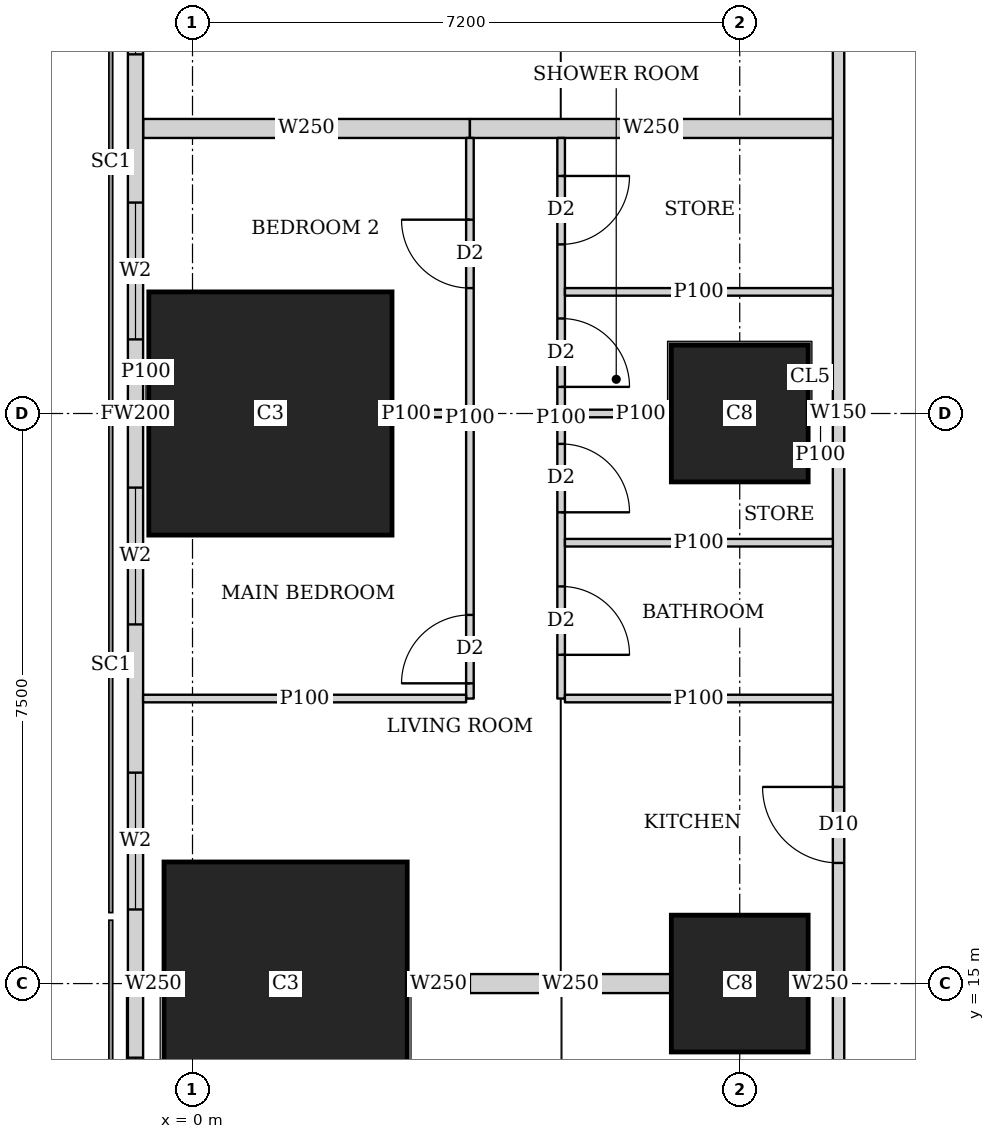
"""IFC4 building model, lengths in metres.
Left out: names, types, materials, properties, quantities, classifications, styles, units other than length and angle.
Written with IfcOpenShell. Run it as: python <this file> out.ifc"""

import sys

from ifc_helpers import new_model, si_unit, direction, frame, frame_2d, origin, origin_2d, place, context, subcontext, project, spatial, rectangle, extrude, element, fill, save


model = new_model("IFC4")
c1 = context("Model", 3, precision=1e-05, world=origin(), true_north=direction((0.0, 1.0)))
c2 = subcontext(c1, "Body", "Model", "MODEL_VIEW")
j1 = project(units=[si_unit("LENGTHUNIT", "METRE"), si_unit("PLANEANGLEUNIT", "RADIAN")], contexts=[c1])
p1 = place(None, origin())
s1 = spatial("IfcSite", under=j1, at=p1, CompositionType="ELEMENT")
p2 = place(p1, origin())
s2 = spatial("IfcBuilding", under=s1, at=p2, CompositionType="ELEMENT")
p3 = place(p2, frame((0.0, 0.0, 20.0)))
s3 = spatial("IfcBuildingStorey", under=s2, at=p3, CompositionType="ELEMENT", Elevation=20.0)
p4 = place(p3, frame((1.225, 15.0, 0.0), z_axis=(0.0, 0.0, 1.0), x_axis=(1.0, 0.0, 0.0)))
e1 = element("IfcColumn", 1, at=p4, inside=s3, PredefinedType="COLUMN", context=c2, shape_type="SweptSolid", body=[
    extrude(rectangle(XDim=3.2, YDim=3.2, at=origin_2d()), origin(), (0.0, 0.0, 1.0), 3.75),
])
p5 = place(p3, frame((7.2, 15.0, 0.0), z_axis=(0.0, 0.0, 1.0), x_axis=(1.0, 0.0, 0.0)))
e2 = element("IfcColumn", 2, at=p5, inside=s3, PredefinedType="COLUMN", context=c2, shape_type="SweptSolid", body=[
    extrude(rectangle(XDim=1.8, YDim=1.8, at=origin_2d()), origin(), (0.0, 0.0, 1.0), 3.75),
])
p6 = place(p3, frame((1.025, 22.5, -0.3), z_axis=(0.0, 0.0, 1.0), x_axis=(1.0, 0.0, 0.0)))
e3 = element("IfcColumn", 3, at=p6, inside=s3, PredefinedType="COLUMN", context=c2, shape_type="SweptSolid", body=[
    extrude(rectangle(XDim=3.2, YDim=3.2, at=origin_2d()), origin(), (0.0, 0.0, 1.0), 4.05),
])
p7 = place(p3, frame((7.2, 22.5, 0.0), z_axis=(0.0, 0.0, 1.0), x_axis=(1.0, 0.0, 0.0)))
e4 = element("IfcColumn", 4, at=p7, inside=s3, PredefinedType="COLUMN", context=c2, shape_type="SweptSolid", body=[
    extrude(rectangle(XDim=1.8, YDim=1.8, at=origin_2d()), origin(), (0.0, 0.0, 1.0), 3.75),
])
p8 = place(p3, frame((-0.75, 42.837, 0.0), z_axis=(0.0, 0.0, 1.0), x_axis=(0.0, -1.0, 0.0)))
e5 = element("IfcWall", 5, at=p8, inside=s3, PredefinedType="SOLIDWALL", context=c2, shape_type="SweptSolid", body=[
    extrude(rectangle(XDim=40.674, YDim=0.2, at=frame_2d((20.337, 0.0))), origin(), (0.0, 0.0, 1.0), 3.5),
])
p9 = place(p8, frame((1.78, 0.0, 0.9)))
e6 = element("IfcOpeningElement", 6, at=p9, cuts=e5, PredefinedType="OPENING", context=c2, shape_type="SweptSolid", body=[
    extrude(rectangle(XDim=1.8, YDim=1.5, at=frame_2d((0.9, 0.75))), frame((0.0, 0.11, 0.0), z_axis=(0.0, -1.0, 0.0), x_axis=(1.0, 0.0, 0.0)), (0.0, 0.0, 1.0), 0.22),
])
p10 = place(p8, frame((6.312, 0.0, 0.9)))
e7 = element("IfcOpeningElement", 7, at=p10, cuts=e5, PredefinedType="OPENING", context=c2, shape_type="SweptSolid", body=[
    extrude(rectangle(XDim=1.8, YDim=1.5, at=frame_2d((0.9, 0.75))), frame((0.0, 0.11, 0.0), z_axis=(0.0, -1.0, 0.0), x_axis=(1.0, 0.0, 0.0)), (0.0, 0.0, 1.0), 0.22),
])
p11 = place(p8, frame((10.062, 0.0, 0.9)))
e8 = element("IfcOpeningElement", 8, at=p11, cuts=e5, PredefinedType="OPENING", context=c2, shape_type="SweptSolid", body=[
    extrude(rectangle(XDim=1.8, YDim=1.5, at=frame_2d((0.9, 0.75))), frame((0.0, 0.11, 0.0), z_axis=(0.0, -1.0, 0.0), x_axis=(1.0, 0.0, 0.0)), (0.0, 0.0, 1.0), 0.22),
])
p12 = place(p8, frame((13.812, 0.0, 0.9)))
e9 = element("IfcOpeningElement", 9, at=p12, cuts=e5, PredefinedType="OPENING", context=c2, shape_type="SweptSolid", body=[
    extrude(rectangle(XDim=1.8, YDim=1.5, at=frame_2d((0.9, 0.75))), frame((0.0, 0.11, 0.0), z_axis=(0.0, -1.0, 0.0), x_axis=(1.0, 0.0, 0.0)), (0.0, 0.0, 1.0), 0.22),
])
p13 = place(p8, frame((17.562, 0.0, 0.9)))
e10 = element("IfcOpeningElement", 10, at=p13, cuts=e5, PredefinedType="OPENING", context=c2, shape_type="SweptSolid", body=[
    extrude(rectangle(XDim=1.8, YDim=1.5, at=frame_2d((0.9, 0.75))), frame((0.0, 0.11, 0.0), z_axis=(0.0, -1.0, 0.0), x_axis=(1.0, 0.0, 0.0)), (0.0, 0.0, 1.0), 0.22),
])
p14 = place(p8, frame((21.312, 0.0, 0.9)))
e11 = element("IfcOpeningElement", 11, at=p14, cuts=e5, PredefinedType="OPENING", context=c2, shape_type="SweptSolid", body=[
    extrude(rectangle(XDim=1.8, YDim=1.5, at=frame_2d((0.9, 0.75))), frame((0.0, 0.11, 0.0), z_axis=(0.0, -1.0, 0.0), x_axis=(1.0, 0.0, 0.0)), (0.0, 0.0, 1.0), 0.22),
])
p15 = place(p8, frame((25.062, 0.0, 0.9)))
e12 = element("IfcOpeningElement", 12, at=p15, cuts=e5, PredefinedType="OPENING", context=c2, shape_type="SweptSolid", body=[
    extrude(rectangle(XDim=1.8, YDim=1.5, at=frame_2d((0.9, 0.75))), frame((0.0, 0.11, 0.0), z_axis=(0.0, -1.0, 0.0), x_axis=(1.0, 0.0, 0.0)), (0.0, 0.0, 1.0), 0.22),
])
p16 = place(p8, frame((28.812, 0.0, 0.9)))
e13 = element("IfcOpeningElement", 13, at=p16, cuts=e5, PredefinedType="OPENING", context=c2, shape_type="SweptSolid", body=[
    extrude(rectangle(XDim=1.8, YDim=1.5, at=frame_2d((0.9, 0.75))), frame((0.0, 0.11, 0.0), z_axis=(0.0, -1.0, 0.0), x_axis=(1.0, 0.0, 0.0)), (0.0, 0.0, 1.0), 0.22),
])
p17 = place(p8, frame((32.562, 0.0, 0.9)))
e14 = element("IfcOpeningElement", 14, at=p17, cuts=e5, PredefinedType="OPENING", context=c2, shape_type="SweptSolid", body=[
    extrude(rectangle(XDim=1.8, YDim=1.5, at=frame_2d((0.9, 0.75))), frame((0.0, 0.11, 0.0), z_axis=(0.0, -1.0, 0.0), x_axis=(1.0, 0.0, 0.0)), (0.0, 0.0, 1.0), 0.22),
])
p18 = place(p8, frame((37.094, 0.0, 0.9)))
e15 = element("IfcOpeningElement", 15, at=p18, cuts=e5, PredefinedType="OPENING", context=c2, shape_type="SweptSolid", body=[
    extrude(rectangle(XDim=1.8, YDim=1.5, at=frame_2d((0.9, 0.75))), frame((0.0, 0.11, 0.0), z_axis=(0.0, -1.0, 0.0), x_axis=(1.0, 0.0, 0.0)), (0.0, 0.0, 1.0), 0.22),
])
p19 = place(p3, frame((8.5, 2.626, 0.0), z_axis=(0.0, 0.0, 1.0), x_axis=(0.0, 1.0, 0.0)))
e16 = element("IfcWall", 16, at=p19, inside=s3, PredefinedType="SOLIDWALL", context=c2, shape_type="SweptSolid", body=[
    extrude(rectangle(XDim=39.773, YDim=0.15, at=frame_2d((19.886, 0.0))), origin(), (0.0, 0.0, 1.0), 2.05),
])
p20 = place(p19, frame((9.786, 0.0, 0.0)))
e17 = element("IfcOpeningElement", 17, at=p20, cuts=e16, PredefinedType="OPENING", context=c2, shape_type="SweptSolid", body=[
    extrude(rectangle(XDim=1.0, YDim=2.0, at=frame_2d((0.5, 1.0))), frame((0.0, 0.085, 0.0), z_axis=(0.0, -1.0, 0.0), x_axis=(1.0, 0.0, 0.0)), (0.0, 0.0, 1.0), 0.17),
])
p21 = place(p19, frame((13.961, 0.0, 0.0)))
e18 = element("IfcOpeningElement", 18, at=p21, cuts=e16, PredefinedType="OPENING", context=c2, shape_type="SweptSolid", body=[
    extrude(rectangle(XDim=1.0, YDim=2.0, at=frame_2d((0.5, 1.0))), frame((0.0, 0.085, 0.0), z_axis=(0.0, -1.0, 0.0), x_axis=(1.0, 0.0, 0.0)), (0.0, 0.0, 1.0), 0.17),
])
p22 = place(p19, frame((24.787, 0.0, 0.0)))
e19 = element("IfcOpeningElement", 19, at=p22, cuts=e16, PredefinedType="OPENING", context=c2, shape_type="SweptSolid", body=[
    extrude(rectangle(XDim=1.0, YDim=2.0, at=frame_2d((0.5, 1.0))), frame((0.0, 0.085, 0.0), z_axis=(0.0, -1.0, 0.0), x_axis=(1.0, 0.0, 0.0)), (0.0, 0.0, 1.0), 0.17),
])
p23 = place(p19, frame((32.287, 0.0, 0.0)))
e20 = element("IfcOpeningElement", 20, at=p23, cuts=e16, PredefinedType="OPENING", context=c2, shape_type="SweptSolid", body=[
    extrude(rectangle(XDim=1.0, YDim=2.0, at=frame_2d((0.5, 1.0))), frame((0.0, 0.085, 0.0), z_axis=(0.0, -1.0, 0.0), x_axis=(1.0, 0.0, 0.0)), (0.0, 0.0, 1.0), 0.17),
])
p24 = place(p3, frame((3.65, 18.75, 0.0), z_axis=(0.0, 0.0, 1.0), x_axis=(0.0, 1.0, 0.0)))
e21 = element("IfcWall", 21, at=p24, inside=s3, PredefinedType="PARTITIONING", context=c2, shape_type="SweptSolid", body=[
    extrude(rectangle(XDim=7.375, YDim=0.1, at=frame_2d((3.688, 0.0))), origin(), (0.0, 0.0, 1.0), 3.5),
])
p25 = place(p24, frame((0.2, 0.0, 0.0)))
e22 = element("IfcOpeningElement", 22, at=p25, cuts=e21, PredefinedType="OPENING", context=c2, shape_type="SweptSolid", body=[
    extrude(rectangle(XDim=0.9, YDim=2.1, at=frame_2d((0.45, 1.05))), frame((0.0, 0.06, 0.0), z_axis=(0.0, -1.0, 0.0), x_axis=(1.0, 0.0, 0.0)), (0.0, 0.0, 1.0), 0.12),
])
p26 = place(p24, frame((5.4, 0.0, 0.0)))
e23 = element("IfcOpeningElement", 23, at=p26, cuts=e21, PredefinedType="OPENING", context=c2, shape_type="SweptSolid", body=[
    extrude(rectangle(XDim=0.9, YDim=2.1, at=frame_2d((0.45, 1.05))), frame((0.0, 0.06, 0.0), z_axis=(0.0, -1.0, 0.0), x_axis=(1.0, 0.0, 0.0)), (0.0, 0.0, 1.0), 0.12),
])
p27 = place(p3, frame((4.85, 18.75, 0.0), z_axis=(0.0, 0.0, 1.0), x_axis=(0.0, 1.0, 0.0)))
e24 = element("IfcWall", 24, at=p27, inside=s3, PredefinedType="PARTITIONING", context=c2, shape_type="SweptSolid", body=[
    extrude(rectangle(XDim=7.375, YDim=0.1, at=frame_2d((3.688, 0.0))), origin(), (0.0, 0.0, 1.0), 3.5),
])
p28 = place(p27, frame((0.575, 0.0, 0.0)))
e25 = element("IfcOpeningElement", 25, at=p28, cuts=e24, PredefinedType="OPENING", context=c2, shape_type="SweptSolid", body=[
    extrude(rectangle(XDim=0.9, YDim=2.1, at=frame_2d((0.45, 1.05))), frame((0.0, 0.06, 0.0), z_axis=(0.0, -1.0, 0.0), x_axis=(1.0, 0.0, 0.0)), (0.0, 0.0, 1.0), 0.12),
])
p29 = place(p27, frame((4.1, 0.0, 0.0)))
e26 = element("IfcOpeningElement", 26, at=p29, cuts=e24, PredefinedType="OPENING", context=c2, shape_type="SweptSolid", body=[
    extrude(rectangle(XDim=0.9, YDim=2.1, at=frame_2d((0.45, 1.05))), frame((0.0, 0.06, 0.0), z_axis=(0.0, -1.0, 0.0), x_axis=(1.0, 0.0, 0.0)), (0.0, 0.0, 1.0), 0.12),
])
p30 = place(p27, frame((2.45, 0.0, 0.0)))
e27 = element("IfcOpeningElement", 27, at=p30, cuts=e24, PredefinedType="OPENING", context=c2, shape_type="SweptSolid", body=[
    extrude(rectangle(XDim=0.9, YDim=2.1, at=frame_2d((0.45, 1.05))), frame((0.0, 0.06, 0.0), z_axis=(0.0, -1.0, 0.0), x_axis=(1.0, 0.0, 0.0)), (0.0, 0.0, 1.0), 0.12),
])
p31 = place(p27, frame((5.975, 0.0, 0.0)))
e28 = element("IfcOpeningElement", 28, at=p31, cuts=e24, PredefinedType="OPENING", context=c2, shape_type="SweptSolid", body=[
    extrude(rectangle(XDim=0.9, YDim=2.1, at=frame_2d((0.45, 1.05))), frame((0.0, 0.06, 0.0), z_axis=(0.0, -1.0, 0.0), x_axis=(1.0, 0.0, 0.0)), (0.0, 0.0, 1.0), 0.12),
])
p32 = place(p3, frame((-0.65, 18.75, 0.0), z_axis=(0.0, 0.0, 1.0), x_axis=(1.0, 0.0, 0.0)))
e29 = element("IfcWall", 29, at=p32, inside=s3, PredefinedType="PARTITIONING", context=c2, shape_type="SweptSolid", body=[
    extrude(rectangle(XDim=4.25, YDim=0.1, at=frame_2d((2.125, 0.0))), origin(), (0.0, 0.0, 1.0), 2.05),
])
p33 = place(p3, frame((-0.65, 22.5, 0.0), z_axis=(0.0, 0.0, 1.0), x_axis=(1.0, 0.0, 0.0)))
e30 = element("IfcWall", 30, at=p33, inside=s3, PredefinedType="PARTITIONING", context=c2, shape_type="SweptSolid", body=[
    extrude(rectangle(XDim=0.074, YDim=0.1, at=frame_2d((0.037, 0.0))), origin(), (0.0, 0.0, 1.0), 3.5),
])
p34 = place(p3, frame((2.626, 22.5, 0.0), z_axis=(0.0, 0.0, 1.0), x_axis=(1.0, 0.0, 0.0)))
e31 = element("IfcWall", 31, at=p34, inside=s3, PredefinedType="PARTITIONING", context=c2, shape_type="SweptSolid", body=[
    extrude(rectangle(XDim=0.974, YDim=0.1, at=frame_2d((0.487, 0.0))), origin(), (0.0, 0.0, 1.0), 3.5),
])
p35 = place(p3, frame((4.9, 18.75, 0.0), z_axis=(0.0, 0.0, 1.0), x_axis=(1.0, 0.0, 0.0)))
e32 = element("IfcWall", 32, at=p35, inside=s3, PredefinedType="PARTITIONING", context=c2, shape_type="SweptSolid", body=[
    extrude(rectangle(XDim=3.525, YDim=0.1, at=frame_2d((1.763, 0.0))), origin(), (0.0, 0.0, 1.0), 3.5),
])
p36 = place(p3, frame((4.9, 22.5, 0.0), z_axis=(0.0, 0.0, 1.0), x_axis=(1.0, 0.0, 0.0)))
e33 = element("IfcWall", 33, at=p36, inside=s3, PredefinedType="PARTITIONING", context=c2, shape_type="SweptSolid", body=[
    extrude(rectangle(XDim=1.399, YDim=0.1, at=frame_2d((0.7, 0.0))), origin(), (0.0, 0.0, 1.0), 3.5),
])
p37 = place(p3, frame((8.101, 22.5, 0.0), z_axis=(0.0, 0.0, 1.0), x_axis=(1.0, 0.0, 0.0)))
e34 = element("IfcWall", 34, at=p37, inside=s3, PredefinedType="PARTITIONING", context=c2, shape_type="SweptSolid", body=[
    extrude(rectangle(XDim=0.324, YDim=0.1, at=frame_2d((0.162, 0.0))), origin(), (0.0, 0.0, 1.0), 3.5),
])
for number, where, z_axis, x_axis in (
    (35, (4.9, 20.8, 0.0), (0.0, 0.0, 1.0), (1.0, 0.0, 0.0)),
    (36, (4.9, 24.1, 0.0), (0.0, 0.0, 1.0), (1.0, 0.0, 0.0)),
):
    element("IfcWall", number, at=place(p3, frame(where, z_axis=z_axis, x_axis=x_axis)), inside=s3, PredefinedType="PARTITIONING", context=c2, shape_type="SweptSolid", body=[
        extrude(rectangle(XDim=3.525, YDim=0.1, at=frame_2d((1.763, 0.0))), origin(), (0.0, 0.0, 1.0), 3.5),
    ])
p38 = place(p3, frame((-0.65, 15.0, 0.0), z_axis=(0.0, 0.0, 1.0), x_axis=(1.0, 0.0, 0.0)))
e37 = element("IfcWall", 37, at=p38, inside=s3, PredefinedType="SOLIDWALL", context=c2, shape_type="SweptSolid", body=[
    extrude(rectangle(XDim=0.274, YDim=0.25, at=frame_2d((0.137, 0.0))), origin(), (0.0, 0.0, 1.0), 2.05),
])
p39 = place(p3, frame((2.826, 15.0, 0.0), z_axis=(0.0, 0.0, 1.0), x_axis=(1.0, 0.0, 0.0)))
e38 = element("IfcWall", 38, at=p39, inside=s3, PredefinedType="SOLIDWALL", context=c2, shape_type="SweptSolid", body=[
    extrude(rectangle(XDim=0.824, YDim=0.25, at=frame_2d((0.412, 0.0))), origin(), (0.0, 0.0, 1.0), 2.05),
])
p40 = place(p3, frame((3.65, 15.0, 0.0), z_axis=(0.0, 0.0, 1.0), x_axis=(1.0, 0.0, 0.0)))
e39 = element("IfcWall", 39, at=p40, inside=s3, PredefinedType="SOLIDWALL", context=c2, shape_type="SweptSolid", body=[
    extrude(rectangle(XDim=2.649, YDim=0.25, at=frame_2d((1.325, 0.0))), origin(), (0.0, 0.0, 1.0), 3.5),
])
p41 = place(p3, frame((8.101, 15.0, 0.0), z_axis=(0.0, 0.0, 1.0), x_axis=(1.0, 0.0, 0.0)))
e40 = element("IfcWall", 40, at=p41, inside=s3, PredefinedType="SOLIDWALL", context=c2, shape_type="SweptSolid", body=[
    extrude(rectangle(XDim=0.324, YDim=0.25, at=frame_2d((0.162, 0.0))), origin(), (0.0, 0.0, 1.0), 3.5),
])
p42 = place(p3, frame((-0.65, 26.25, 0.0), z_axis=(0.0, 0.0, 1.0), x_axis=(1.0, 0.0, 0.0)))
e41 = element("IfcWall", 41, at=p42, inside=s3, PredefinedType="SOLIDWALL", context=c2, shape_type="SweptSolid", body=[
    extrude(rectangle(XDim=4.3, YDim=0.25, at=frame_2d((2.15, 0.0))), origin(), (0.0, 0.0, 1.0), 2.05),
])
p43 = place(p3, frame((3.65, 26.25, 0.0), z_axis=(0.0, 0.0, 1.0), x_axis=(1.0, 0.0, 0.0)))
e42 = element("IfcWall", 42, at=p43, inside=s3, PredefinedType="SOLIDWALL", context=c2, shape_type="SweptSolid", body=[
    extrude(rectangle(XDim=4.775, YDim=0.25, at=frame_2d((2.388, 0.0))), origin(), (0.0, 0.0, 1.0), 3.5),
])
p44 = place(p12, origin())
e43 = element("IfcWindow", 43, at=p44, inside=s3, PartitioningType="SINGLE_PANEL", PredefinedType="WINDOW", context=c2, shape_type="SweptSolid", body=[
    extrude(rectangle(XDim=1.8, YDim=1.5, at=frame_2d((0.9, 0.75))), frame((0.0, 0.03, 0.0), z_axis=(0.0, -1.0, 0.0), x_axis=(1.0, 0.0, 0.0)), (0.0, 0.0, 1.0), 0.06),
])
fill(e9, e43)
p45 = place(p13, origin())
e44 = element("IfcWindow", 44, at=p45, inside=s3, PartitioningType="SINGLE_PANEL", PredefinedType="WINDOW", context=c2, shape_type="SweptSolid", body=[
    extrude(rectangle(XDim=1.8, YDim=1.5, at=frame_2d((0.9, 0.75))), frame((0.0, 0.03, 0.0), z_axis=(0.0, -1.0, 0.0), x_axis=(1.0, 0.0, 0.0)), (0.0, 0.0, 1.0), 0.06),
])
fill(e10, e44)
p46 = place(p14, origin())
e45 = element("IfcWindow", 45, at=p46, inside=s3, PartitioningType="SINGLE_PANEL", PredefinedType="WINDOW", context=c2, shape_type="SweptSolid", body=[
    extrude(rectangle(XDim=1.8, YDim=1.5, at=frame_2d((0.9, 0.75))), frame((0.0, 0.03, 0.0), z_axis=(0.0, -1.0, 0.0), x_axis=(1.0, 0.0, 0.0)), (0.0, 0.0, 1.0), 0.06),
])
fill(e11, e45)
p47 = place(p15, origin())
e46 = element("IfcWindow", 46, at=p47, inside=s3, PartitioningType="SINGLE_PANEL", PredefinedType="WINDOW", context=c2, shape_type="SweptSolid", body=[
    extrude(rectangle(XDim=1.8, YDim=1.5, at=frame_2d((0.9, 0.75))), frame((0.0, 0.03, 0.0), z_axis=(0.0, -1.0, 0.0), x_axis=(1.0, 0.0, 0.0)), (0.0, 0.0, 1.0), 0.06),
])
fill(e12, e46)
p48 = place(p16, origin())
e47 = element("IfcWindow", 47, at=p48, inside=s3, PartitioningType="SINGLE_PANEL", PredefinedType="WINDOW", context=c2, shape_type="SweptSolid", body=[
    extrude(rectangle(XDim=1.8, YDim=1.5, at=frame_2d((0.9, 0.75))), frame((0.0, 0.03, 0.0), z_axis=(0.0, -1.0, 0.0), x_axis=(1.0, 0.0, 0.0)), (0.0, 0.0, 1.0), 0.06),
])
fill(e13, e47)
p49 = place(p25, origin())
e48 = element("IfcDoor", 48, at=p49, inside=s3, OperationType="SINGLE_SWING_LEFT", PredefinedType="DOOR", context=c2, shape_type="SweptSolid", body=[
    extrude(rectangle(XDim=0.9, YDim=2.1, at=frame_2d((0.45, 1.05))), frame((0.0, 0.025, 0.0), z_axis=(0.0, -1.0, 0.0), x_axis=(1.0, 0.0, 0.0)), (0.0, 0.0, 1.0), 0.05),
])
fill(e22, e48)
p50 = place(p26, origin())
e49 = element("IfcDoor", 49, at=p50, inside=s3, OperationType="SINGLE_SWING_RIGHT", PredefinedType="DOOR", context=c2, shape_type="SweptSolid", body=[
    extrude(rectangle(XDim=0.9, YDim=2.1, at=frame_2d((0.45, 1.05))), frame((0.0, 0.025, 0.0), z_axis=(0.0, -1.0, 0.0), x_axis=(1.0, 0.0, 0.0)), (0.0, 0.0, 1.0), 0.05),
])
fill(e23, e49)
p51 = place(p28, origin())
e50 = element("IfcDoor", 50, at=p51, inside=s3, OperationType="SINGLE_SWING_RIGHT", PredefinedType="DOOR", context=c2, shape_type="SweptSolid", body=[
    extrude(rectangle(XDim=0.9, YDim=2.1, at=frame_2d((0.45, 1.05))), frame((0.0, 0.025, 0.0), z_axis=(0.0, -1.0, 0.0), x_axis=(1.0, 0.0, 0.0)), (0.0, 0.0, 1.0), 0.05),
])
fill(e25, e50)
p52 = place(p29, origin())
e51 = element("IfcDoor", 51, at=p52, inside=s3, OperationType="SINGLE_SWING_RIGHT", PredefinedType="DOOR", context=c2, shape_type="SweptSolid", body=[
    extrude(rectangle(XDim=0.9, YDim=2.1, at=frame_2d((0.45, 1.05))), frame((0.0, 0.025, 0.0), z_axis=(0.0, -1.0, 0.0), x_axis=(1.0, 0.0, 0.0)), (0.0, 0.0, 1.0), 0.05),
])
fill(e26, e51)
p53 = place(p30, origin())
e52 = element("IfcDoor", 52, at=p53, inside=s3, OperationType="SINGLE_SWING_RIGHT", PredefinedType="DOOR", context=c2, shape_type="SweptSolid", body=[
    extrude(rectangle(XDim=0.9, YDim=2.1, at=frame_2d((0.45, 1.05))), frame((0.0, 0.025, 0.0), z_axis=(0.0, -1.0, 0.0), x_axis=(1.0, 0.0, 0.0)), (0.0, 0.0, 1.0), 0.05),
])
fill(e27, e52)
p54 = place(p31, origin())
e53 = element("IfcDoor", 53, at=p54, inside=s3, OperationType="SINGLE_SWING_LEFT", PredefinedType="DOOR", context=c2, shape_type="SweptSolid", body=[
    extrude(rectangle(XDim=0.9, YDim=2.1, at=frame_2d((0.45, 1.05))), frame((0.0, 0.025, 0.0), z_axis=(0.0, -1.0, 0.0), x_axis=(1.0, 0.0, 0.0)), (0.0, 0.0, 1.0), 0.05),
])
fill(e28, e53)
p55 = place(p21, origin())
e54 = element("IfcDoor", 54, at=p55, inside=s3, OperationType="SINGLE_SWING_RIGHT", PredefinedType="DOOR", context=c2, shape_type="SweptSolid", body=[
    extrude(rectangle(XDim=1.0, YDim=2.0, at=frame_2d((0.5, 1.0))), frame((0.0, 0.025, 0.0), z_axis=(0.0, -1.0, 0.0), x_axis=(1.0, 0.0, 0.0)), (0.0, 0.0, 1.0), 0.05),
])
fill(e18, e54)
save(model, sys.argv[1])
